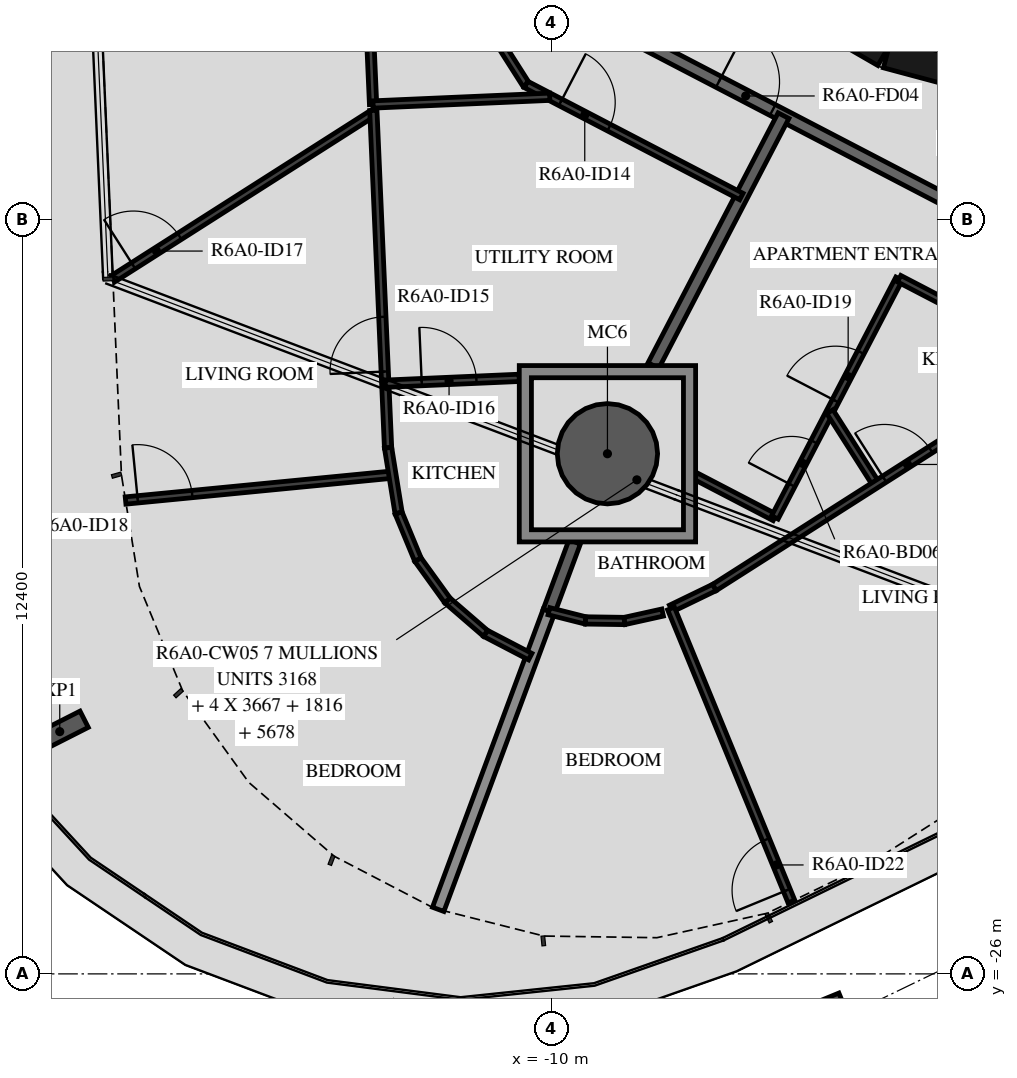
"""IFC4 building model, lengths in metres.
Left out: names, types, materials, properties, quantities, classifications, styles, units other than length and angle.
Written with IfcOpenShell. Run it as: python <this file> out.ifc"""

import sys

from ifc_helpers import new_model, si_unit, direction, frame, frame_2d, origin, origin_2d, place, context, subcontext, project, spatial, polyline, rectangle, hollow_circle, i_section, outline, extrude, element, fill, save


model = new_model("IFC4")
c1 = context("Model", 3, precision=1e-05, world=origin(), true_north=direction((0.0, 1.0)))
c2 = subcontext(c1, "Body", "Model", "MODEL_VIEW")
j1 = project(units=[si_unit("LENGTHUNIT", "METRE"), si_unit("PLANEANGLEUNIT", "RADIAN")], contexts=[c1])
p1 = place(None, origin())
s1 = spatial("IfcSite", under=j1, at=p1, CompositionType="ELEMENT")
p2 = place(p1, origin())
s2 = spatial("IfcBuilding", under=s1, at=p2, CompositionType="ELEMENT")
p3 = place(p2, frame((0.0, 0.0, 226.7)))
s3 = spatial("IfcBuildingStorey", under=s2, at=p3, CompositionType="ELEMENT", Elevation=226.7)
p4 = place(p3, frame((-9.082, -17.446, -0.45), z_axis=(0.0, 0.0, 1.0), x_axis=(1.0, 0.0, 0.0)))
e1 = element("IfcColumn", 1, at=p4, inside=s3, PredefinedType="COLUMN", context=c2, shape_type="SweptSolid", body=[
    extrude(hollow_circle(Radius=0.825, WallThickness=0.04, at=origin_2d()), origin(), (0.0, 0.0, 1.0), 3.57),
])
for number, where, z_axis, x_axis in (
    (2, (-18.089, -22.016, -0.45), (0.0, 0.0, 1.0), (-0.452, 0.892, 0.0)),
    (3, (-5.243, -26.789, -0.45), (0.0, 0.0, 1.0), (-0.925, -0.38, 0.0)),
):
    element("IfcColumn", number, at=place(p3, frame(where, z_axis=z_axis, x_axis=x_axis)), inside=s3, PredefinedType="COLUMN", context=c2, shape_type="SweptSolid", body=[
        extrude(i_section(OverallWidth=0.3, OverallDepth=0.9, WebThickness=0.019, FlangeThickness=0.035, FilletRadius=0.03, at=origin_2d()), origin(), (0.0, 0.0, 1.0), 3.57),
    ])
for number, where, z_axis, x_axis in (
    (4, (-7.137, -9.329, 0.0), (0.0, 0.0, 1.0), (0.866, -0.5, 0.0)),
    (5, (-4.479, -10.858, 0.0), (0.0, 0.0, 1.0), (0.966, -0.259, 0.0)),
):
    element("IfcWall", number, at=place(p3, frame(where, z_axis=z_axis, x_axis=x_axis)), inside=s3, PredefinedType="SHEAR", context=c2, shape_type="SweptSolid", body=[
        extrude(rectangle(XDim=3.033, YDim=0.5, at=frame_2d((1.516, 0.0))), origin(), (0.0, 0.0, 1.0), 3.12),
    ])
p5 = place(p3, frame((-9.372, -10.228, 0.0), z_axis=(0.0, 0.0, 1.0), x_axis=(0.887005184532, -0.461759464021, 0.0)))
e6 = element("IfcWall", 6, at=p5, inside=s3, PredefinedType="STANDARD", context=c2, shape_type="SweptSolid", body=[
    extrude(rectangle(XDim=7.181, YDim=0.2, at=frame_2d((3.591, 0.0))), origin(), (0.0, 0.0, 1.0), 3.12),
])
p6 = place(p5, frame((2.391, 0.0, 0.0)))
e7 = element("IfcOpeningElement", 7, at=p6, cuts=e6, PredefinedType="OPENING", context=c2, shape_type="SweptSolid", body=[
    extrude(rectangle(XDim=1.0, YDim=2.1, at=frame_2d((0.5, 1.05))), frame((0.0, 0.11, 0.0), z_axis=(0.0, -1.0, 0.0), x_axis=(1.0, 0.0, 0.0)), (0.0, 0.0, 1.0), 0.22),
])
p7 = place(p3, frame((-8.326, -15.996, 0.0), z_axis=(0.0, 0.0, 1.0), x_axis=(0.461739255077, 0.887015704664, 0.0)))
e8 = element("IfcWall", 8, at=p7, inside=s3, PredefinedType="STANDARD", context=c2, shape_type="SweptSolid", body=[
    extrude(rectangle(XDim=4.633, YDim=0.2, at=frame_2d((2.317, 0.0))), origin(), (0.0, 0.0, 1.0), 3.12),
])
p8 = place(p3, frame((-11.865, -24.939, 0.0), z_axis=(0.0, 0.0, 1.0), x_axis=(0.348236919929, 0.937406554062, 0.0)))
e9 = element("IfcWall", 9, at=p8, inside=s3, PredefinedType="STANDARD", context=c2, shape_type="SweptSolid", body=[
    extrude(rectangle(XDim=5.231, YDim=0.2, at=frame_2d((2.615, 0.0))), origin(), (0.0, 0.0, 1.0), 2.73),
])
p9 = place(p3, frame((-10.044, -20.036, 0.0), z_axis=(0.0, 0.0, 1.0), x_axis=(0.348282344491, 0.937389678051, 0.0)))
e10 = element("IfcWall", 10, at=p9, inside=s3, PredefinedType="STANDARD", context=c2, shape_type="SweptSolid", body=[
    extrude(rectangle(XDim=1.216, YDim=0.2, at=frame_2d((0.608, 0.0))), origin(), (0.0, 0.0, 1.0), 3.12),
])
p10 = place(p3, frame((-13.137, -7.111, 0.0), z_axis=(0.0, 0.0, 1.0), x_axis=(0.537300549444, -0.843390846267, 0.0)))
e11 = element("IfcWall", 11, at=p10, inside=s3, PredefinedType="PARTITIONING", context=c2, shape_type="SweptSolid", body=[
    extrude(rectangle(XDim=5.054, YDim=0.12, at=frame_2d((2.527, 0.0))), origin(), (0.0, 0.0, 1.0), 3.12),
])
p11 = place(p10, frame((1.5, 0.0, 0.0)))
e12 = element("IfcOpeningElement", 12, at=p11, cuts=e11, PredefinedType="OPENING", context=c2, shape_type="SweptSolid", body=[
    extrude(rectangle(XDim=0.8, YDim=2.1, at=frame_2d((0.4, 1.05))), frame((0.0, 0.07, 0.0), z_axis=(0.0, -1.0, 0.0), x_axis=(1.0, 0.0, 0.0)), (0.0, 0.0, 1.0), 0.14),
])
p12 = place(p3, frame((-10.421, -11.373, 0.0), z_axis=(0.0, 0.0, 1.0), x_axis=(0.887006451745, -0.461757029792, 0.0)))
e13 = element("IfcWall", 13, at=p12, inside=s3, PredefinedType="PARTITIONING", context=c2, shape_type="SweptSolid", body=[
    extrude(rectangle(XDim=3.992, YDim=0.12, at=frame_2d((1.996, 0.0))), origin(), (0.0, 0.0, 1.0), 3.12),
])
p13 = place(p12, frame((0.639, 0.0, 0.0)))
e14 = element("IfcOpeningElement", 14, at=p13, cuts=e13, PredefinedType="OPENING", context=c2, shape_type="SweptSolid", body=[
    extrude(rectangle(XDim=0.9, YDim=2.1, at=frame_2d((0.45, 1.05))), frame((0.0, 0.07, 0.0), z_axis=(0.0, -1.0, 0.0), x_axis=(1.0, 0.0, 0.0)), (0.0, 0.0, 1.0), 0.14),
])
p14 = place(p3, frame((-12.936, -11.703, 0.0), z_axis=(0.0, 0.0, 1.0), x_axis=(-0.043610108597, 0.999048626658, 0.0)))
e15 = element("IfcWall", 15, at=p14, inside=s3, PredefinedType="PARTITIONING", context=c2, shape_type="SweptSolid", body=[
    extrude(rectangle(XDim=4.596, YDim=0.12, at=frame_2d((2.298, 0.0))), origin(), (0.0, 0.0, 1.0), 3.12),
])
p15 = place(p3, frame((-17.215, -14.57, 0.0), z_axis=(0.0, 0.0, 1.0), x_axis=(0.843396239681, 0.537292083407, 0.0)))
e16 = element("IfcWall", 16, at=p15, inside=s3, PredefinedType="PARTITIONING", context=c2, shape_type="SweptSolid", body=[
    extrude(rectangle(XDim=5.081, YDim=0.12, at=frame_2d((2.54, 0.0))), origin(), (0.0, 0.0, 1.0), 3.12),
])
p16 = place(p15, frame((0.4, 0.0, 0.0)))
e17 = element("IfcOpeningElement", 17, at=p16, cuts=e16, PredefinedType="OPENING", context=c2, shape_type="SweptSolid", body=[
    extrude(rectangle(XDim=0.9, YDim=2.1, at=frame_2d((0.45, 1.05))), frame((0.0, 0.07, 0.0), z_axis=(0.0, -1.0, 0.0), x_axis=(1.0, 0.0, 0.0)), (0.0, 0.0, 1.0), 0.14),
])
p17 = place(p3, frame((-12.936, -11.703, 0.0), z_axis=(0.0, 0.0, 1.0), x_axis=(0.999046310188, 0.043663143495, 0.0)))
e18 = element("IfcWall", 18, at=p17, inside=s3, PredefinedType="PARTITIONING", context=c2, shape_type="SweptSolid", body=[
    extrude(rectangle(XDim=2.907, YDim=0.12, at=frame_2d((1.454, 0.0))), origin(), (0.0, 0.0, 1.0), 3.12),
])
p18 = place(p3, frame((-12.69, -17.347, 0.0), z_axis=(0.0, 0.0, 1.0), x_axis=(-0.043618497177, 0.999048260448, 0.0)))
e19 = element("IfcWall", 19, at=p18, inside=s3, PredefinedType="PARTITIONING", context=c2, shape_type="SweptSolid", body=[
    extrude(rectangle(XDim=5.552, YDim=0.12, at=frame_2d((2.776, 0.0))), origin(), (0.0, 0.0, 1.0), 3.12),
])
p19 = place(p18, frame((1.254, 0.0, 0.0)))
e20 = element("IfcOpeningElement", 20, at=p19, cuts=e19, PredefinedType="OPENING", context=c2, shape_type="SweptSolid", body=[
    extrude(rectangle(XDim=0.9, YDim=2.1, at=frame_2d((0.45, 1.05))), frame((0.0, 0.07, 0.0), z_axis=(0.0, -1.0, 0.0), x_axis=(1.0, 0.0, 0.0)), (0.0, 0.0, 1.0), 0.14),
])
p20 = place(p3, frame((-17.007, -18.216, 0.0), z_axis=(0.0, 0.0, 1.0), x_axis=(0.995320337688, 0.09663035436, 0.0)))
e21 = element("IfcWall", 21, at=p20, inside=s3, PredefinedType="PARTITIONING", context=c2, shape_type="SweptSolid", body=[
    extrude(rectangle(XDim=4.409, YDim=0.12, at=frame_2d((2.205, 0.0))), origin(), (0.0, 0.0, 1.0), 3.12),
])
p21 = place(p20, frame((0.2, 0.0, 0.0)))
e22 = element("IfcOpeningElement", 22, at=p21, cuts=e21, PredefinedType="OPENING", context=c2, shape_type="SweptSolid", body=[
    extrude(rectangle(XDim=0.9, YDim=2.1, at=frame_2d((0.45, 1.05))), frame((0.0, 0.07, 0.0), z_axis=(0.0, -1.0, 0.0), x_axis=(1.0, 0.0, 0.0)), (0.0, 0.0, 1.0), 0.14),
])
p22 = place(p3, frame((-12.517, -18.42, 0.0), z_axis=(0.0, 0.0, 1.0), x_axis=(-0.159260688022, 0.987236563976, 0.0)))
e23 = element("IfcWall", 23, at=p22, inside=s3, PredefinedType="PARTITIONING", context=c2, shape_type="SweptSolid", body=[
    extrude(rectangle(XDim=1.087, YDim=0.12, at=frame_2d((0.543, 0.0))), origin(), (0.0, 0.0, 1.0), 3.12),
])
p23 = place(p3, frame((-12.736, -16.295, 0.0), z_axis=(0.0, 0.0, 1.0), x_axis=(0.999043796611, 0.043720618177, 0.0)))
e24 = element("IfcWall", 24, at=p23, inside=s3, PredefinedType="PARTITIONING", context=c2, shape_type="SweptSolid", body=[
    extrude(rectangle(XDim=2.206, YDim=0.12, at=frame_2d((1.103, 0.0))), origin(), (0.0, 0.0, 1.0), 3.12),
])
p24 = place(p23, frame((0.6, 0.0, 0.0)))
e25 = element("IfcOpeningElement", 25, at=p24, cuts=e24, PredefinedType="OPENING", context=c2, shape_type="SweptSolid", body=[
    extrude(rectangle(XDim=0.9, YDim=2.1, at=frame_2d((0.45, 1.05))), frame((0.0, 0.07, 0.0), z_axis=(0.0, -1.0, 0.0), x_axis=(1.0, 0.0, 0.0)), (0.0, 0.0, 1.0), 0.14),
])
for number, where, z_axis, x_axis in (
    (26, (-10.352, -20.783, 0.0), (0.0, 0.0, 1.0), (-0.887, 0.462, 0.0)),
    (27, (-11.087, -20.4, 0.0), (0.0, 0.0, 1.0), (-0.757, 0.654, 0.0)),
):
    element("IfcWall", number, at=place(p3, frame(where, z_axis=z_axis, x_axis=x_axis)), inside=s3, PredefinedType="PARTITIONING", context=c2, shape_type="SweptSolid", body=[
        extrude(rectangle(XDim=0.829, YDim=0.12, at=frame_2d((0.415, 0.0))), origin(), (0.0, 0.0, 1.0), 3.12),
    ])
p25 = place(p3, frame((-11.714, -19.858, 0.0), z_axis=(0.0, 0.0, 1.0), x_axis=(-0.585436792562, 0.810718053281, 0.0)))
e28 = element("IfcWall", 28, at=p25, inside=s3, PredefinedType="PARTITIONING", context=c2, shape_type="SweptSolid", body=[
    extrude(rectangle(XDim=0.829, YDim=0.12, at=frame_2d((0.415, 0.0))), origin(), (0.0, 0.0, 1.0), 3.12),
])
p26 = place(p3, frame((-12.199, -19.186, 0.0), z_axis=(0.0, 0.0, 1.0), x_axis=(-0.382585904135, 0.923919923996, 0.0)))
e29 = element("IfcWall", 29, at=p26, inside=s3, PredefinedType="PARTITIONING", context=c2, shape_type="SweptSolid", body=[
    extrude(rectangle(XDim=0.829, YDim=0.12, at=frame_2d((0.415, 0.0))), origin(), (0.0, 0.0, 1.0), 3.12),
])
p27 = place(p3, frame((-7.632, -17.815, 0.0), z_axis=(0.0, 0.0, 1.0), x_axis=(0.886960889958, -0.461844540602, 0.0)))
e30 = element("IfcWall", 30, at=p27, inside=s3, PredefinedType="PARTITIONING", context=c2, shape_type="SweptSolid", body=[
    extrude(rectangle(XDim=1.469, YDim=0.12, at=frame_2d((0.734, 0.0))), origin(), (0.0, 0.0, 1.0), 3.12),
])
p28 = place(p3, frame((-6.329, -18.494, 0.0), z_axis=(0.0, 0.0, 1.0), x_axis=(0.461759058182, 0.887005395805, 0.0)))
e31 = element("IfcWall", 31, at=p28, inside=s3, PredefinedType="PARTITIONING", context=c2, shape_type="SweptSolid", body=[
    extrude(rectangle(XDim=4.427, YDim=0.12, at=frame_2d((2.213, 0.0))), origin(), (0.0, 0.0, 1.0), 3.12),
])
p29 = place(p28, frame((0.6, 0.0, 0.0)))
e32 = element("IfcOpeningElement", 32, at=p29, cuts=e31, PredefinedType="OPENING", context=c2, shape_type="SweptSolid", body=[
    extrude(rectangle(XDim=0.8, YDim=2.1, at=frame_2d((0.4, 1.05))), frame((0.0, 0.07, 0.0), z_axis=(0.0, -1.0, 0.0), x_axis=(1.0, 0.0, 0.0)), (0.0, 0.0, 1.0), 0.14),
])
p30 = place(p28, frame((2.161, 0.0, 0.0)))
e33 = element("IfcOpeningElement", 33, at=p30, cuts=e31, PredefinedType="OPENING", context=c2, shape_type="SweptSolid", body=[
    extrude(rectangle(XDim=0.9, YDim=2.1, at=frame_2d((0.45, 1.05))), frame((0.0, 0.07, 0.0), z_axis=(0.0, -1.0, 0.0), x_axis=(1.0, 0.0, 0.0)), (0.0, 0.0, 1.0), 0.14),
])
p31 = place(p3, frame((-4.285, -14.567, 0.0), z_axis=(0.0, 0.0, 1.0), x_axis=(0.887033177378, -0.46170568789, 0.0)))
e34 = element("IfcWall", 34, at=p31, inside=s3, PredefinedType="PARTITIONING", context=c2, shape_type="SweptSolid", body=[
    extrude(rectangle(XDim=1.067, YDim=0.12, at=frame_2d((0.534, 0.0))), origin(), (0.0, 0.0, 1.0), 3.12),
])
p32 = place(p3, frame((-10.044, -20.036, 0.0), z_axis=(0.0, 0.0, 1.0), x_axis=(0.969630684539, -0.24457378355, 0.0)))
e35 = element("IfcWall", 35, at=p32, inside=s3, PredefinedType="PARTITIONING", context=c2, shape_type="SweptSolid", body=[
    extrude(rectangle(XDim=0.62, YDim=0.12, at=frame_2d((0.31, 0.0))), origin(), (0.0, 0.0, 1.0), 3.12),
])
for number, where, z_axis, x_axis in (
    (36, (-9.443, -20.187, 0.0), (0.0, 0.0, 1.0), (1.0, -0.014, 0.0)),
    (37, (-8.801, -20.197, 0.0), (0.0, 0.0, 1.0), (0.976, 0.216, 0.0)),
):
    element("IfcWall", number, at=place(p3, frame(where, z_axis=z_axis, x_axis=x_axis)), inside=s3, PredefinedType="PARTITIONING", context=c2, shape_type="SweptSolid", body=[
        extrude(rectangle(XDim=0.642, YDim=0.12, at=frame_2d((0.321, 0.0))), origin(), (0.0, 0.0, 1.0), 3.12),
    ])
p33 = place(p3, frame((-4.662, -17.95, 0.0), z_axis=(0.0, 0.0, 1.0), x_axis=(-0.537254271207, 0.843420327043, 0.0)))
e38 = element("IfcWall", 38, at=p33, inside=s3, PredefinedType="PARTITIONING", context=c2, shape_type="SweptSolid", body=[
    extrude(rectangle(XDim=1.418, YDim=0.12, at=frame_2d((0.709, 0.0))), origin(), (0.0, 0.0, 1.0), 3.12),
])
p34 = place(p3, frame((-8.037, -19.991, 0.0), z_axis=(0.0, 0.0, 1.0), x_axis=(0.900073671326, 0.435737749323, 0.0)))
e39 = element("IfcWall", 39, at=p34, inside=s3, PredefinedType="PARTITIONING", context=c2, shape_type="SweptSolid", body=[
    extrude(rectangle(XDim=0.794, YDim=0.12, at=frame_2d((0.397, 0.0))), origin(), (0.0, 0.0, 1.0), 3.12),
])
p35 = place(p3, frame((-7.322, -19.645, 0.0), z_axis=(0.0, 0.0, 1.0), x_axis=(0.843385361817, 0.537309158188, 0.0)))
e40 = element("IfcWall", 40, at=p35, inside=s3, PredefinedType="PARTITIONING", context=c2, shape_type="SweptSolid", body=[
    extrude(rectangle(XDim=8.814, YDim=0.12, at=frame_2d((4.407, 0.0))), origin(), (0.0, 0.0, 1.0), 3.12),
])
p36 = place(p35, frame((3.314, 0.0, 0.0)))
e41 = element("IfcOpeningElement", 41, at=p36, cuts=e40, PredefinedType="OPENING", context=c2, shape_type="SweptSolid", body=[
    extrude(rectangle(XDim=0.9, YDim=2.1, at=frame_2d((0.45, 1.05))), frame((0.0, 0.07, 0.0), z_axis=(0.0, -1.0, 0.0), x_axis=(1.0, 0.0, 0.0)), (0.0, 0.0, 1.0), 0.14),
])
p37 = place(p3, frame((-6.057, -24.81, 0.0), z_axis=(0.0, 0.0, 1.0), x_axis=(-0.380052033163, 0.924965108579, 0.0)))
e42 = element("IfcWall", 42, at=p37, inside=s3, PredefinedType="PARTITIONING", context=c2, shape_type="SweptSolid", body=[
    extrude(rectangle(XDim=5.21, YDim=0.12, at=frame_2d((2.605, 0.0))), origin(), (0.0, 0.0, 1.0), 3.12),
])
p38 = place(p37, frame((0.2, 0.0, 0.0)))
e43 = element("IfcOpeningElement", 43, at=p38, cuts=e42, PredefinedType="OPENING", context=c2, shape_type="SweptSolid", body=[
    extrude(rectangle(XDim=0.9, YDim=2.1, at=frame_2d((0.45, 1.05))), frame((0.0, 0.07, 0.0), z_axis=(0.0, -1.0, 0.0), x_axis=(1.0, 0.0, 0.0)), (0.0, 0.0, 1.0), 0.14),
])
p39 = place(p3, origin())
e44 = element("IfcWall", 44, at=p39, inside=s3, PredefinedType="STANDARD", context=c2, shape_type="SweptSolid", body=[
    extrude(outline(polyline([(-7.632, -15.996), (-7.632, -18.896), (-10.532, -18.896), (-10.532, -15.996), (-7.632, -15.996)]), holes=[polyline([(-10.332, -18.696), (-7.832, -18.696), (-7.832, -16.196), (-10.332, -16.196), (-10.332, -18.696)])]), origin(), (0.0, 0.0, 1.0), 3.12),
])
p40 = place(p6, origin())
e45 = element("IfcDoor", 45, at=p40, inside=s3, OperationType="SINGLE_SWING_RIGHT", PredefinedType="DOOR", context=c2, shape_type="SweptSolid", body=[
    extrude(rectangle(XDim=1.0, YDim=2.1, at=frame_2d((0.5, 1.05))), frame((0.0, 0.025, 0.0), z_axis=(0.0, -1.0, 0.0), x_axis=(1.0, 0.0, 0.0)), (0.0, 0.0, 1.0), 0.05),
])
fill(e7, e45)
p41 = place(p13, origin())
e46 = element("IfcDoor", 46, at=p41, inside=s3, OperationType="SINGLE_SWING_RIGHT", PredefinedType="DOOR", context=c2, shape_type="SweptSolid", body=[
    extrude(rectangle(XDim=0.9, YDim=2.1, at=frame_2d((0.45, 1.05))), frame((0.0, 0.025, 0.0), z_axis=(0.0, -1.0, 0.0), x_axis=(1.0, 0.0, 0.0)), (0.0, 0.0, 1.0), 0.05),
])
fill(e14, e46)
p42 = place(p19, origin())
e47 = element("IfcDoor", 47, at=p42, inside=s3, OperationType="SINGLE_SWING_RIGHT", PredefinedType="DOOR", context=c2, shape_type="SweptSolid", body=[
    extrude(rectangle(XDim=0.9, YDim=2.1, at=frame_2d((0.45, 1.05))), frame((0.0, 0.025, 0.0), z_axis=(0.0, -1.0, 0.0), x_axis=(1.0, 0.0, 0.0)), (0.0, 0.0, 1.0), 0.05),
])
fill(e20, e47)
p43 = place(p24, origin())
e48 = element("IfcDoor", 48, at=p43, inside=s3, OperationType="SINGLE_SWING_RIGHT", PredefinedType="DOOR", context=c2, shape_type="SweptSolid", body=[
    extrude(rectangle(XDim=0.9, YDim=2.1, at=frame_2d((0.45, 1.05))), frame((0.0, 0.025, 0.0), z_axis=(0.0, -1.0, 0.0), x_axis=(1.0, 0.0, 0.0)), (0.0, 0.0, 1.0), 0.05),
])
fill(e25, e48)
p44 = place(p16, origin())
e49 = element("IfcDoor", 49, at=p44, inside=s3, OperationType="SINGLE_SWING_LEFT", PredefinedType="DOOR", context=c2, shape_type="SweptSolid", body=[
    extrude(rectangle(XDim=0.9, YDim=2.1, at=frame_2d((0.45, 1.05))), frame((0.0, 0.025, 0.0), z_axis=(0.0, -1.0, 0.0), x_axis=(1.0, 0.0, 0.0)), (0.0, 0.0, 1.0), 0.05),
])
fill(e17, e49)
p45 = place(p21, origin())
e50 = element("IfcDoor", 50, at=p45, inside=s3, OperationType="SINGLE_SWING_RIGHT", PredefinedType="DOOR", context=c2, shape_type="SweptSolid", body=[
    extrude(rectangle(XDim=0.9, YDim=2.1, at=frame_2d((0.45, 1.05))), frame((0.0, 0.025, 0.0), z_axis=(0.0, -1.0, 0.0), x_axis=(1.0, 0.0, 0.0)), (0.0, 0.0, 1.0), 0.05),
])
fill(e22, e50)
p46 = place(p29, origin())
e51 = element("IfcDoor", 51, at=p46, inside=s3, OperationType="SINGLE_SWING_LEFT", PredefinedType="DOOR", context=c2, shape_type="SweptSolid", body=[
    extrude(rectangle(XDim=0.8, YDim=2.1, at=frame_2d((0.4, 1.05))), frame((0.0, 0.025, 0.0), z_axis=(0.0, -1.0, 0.0), x_axis=(1.0, 0.0, 0.0)), (0.0, 0.0, 1.0), 0.05),
])
fill(e32, e51)
p47 = place(p30, origin())
e52 = element("IfcDoor", 52, at=p47, inside=s3, OperationType="SINGLE_SWING_LEFT", PredefinedType="DOOR", context=c2, shape_type="SweptSolid", body=[
    extrude(rectangle(XDim=0.9, YDim=2.1, at=frame_2d((0.45, 1.05))), frame((0.0, 0.025, 0.0), z_axis=(0.0, -1.0, 0.0), x_axis=(1.0, 0.0, 0.0)), (0.0, 0.0, 1.0), 0.05),
])
fill(e33, e52)
p48 = place(p36, origin())
e53 = element("IfcDoor", 53, at=p48, inside=s3, OperationType="SINGLE_SWING_LEFT", PredefinedType="DOOR", context=c2, shape_type="SweptSolid", body=[
    extrude(rectangle(XDim=0.9, YDim=2.1, at=frame_2d((0.45, 1.05))), frame((0.0, 0.025, 0.0), z_axis=(0.0, -1.0, 0.0), x_axis=(1.0, 0.0, 0.0)), (0.0, 0.0, 1.0), 0.05),
])
fill(e41, e53)
p49 = place(p38, origin())
e54 = element("IfcDoor", 54, at=p49, inside=s3, OperationType="SINGLE_SWING_LEFT", PredefinedType="DOOR", context=c2, shape_type="SweptSolid", body=[
    extrude(rectangle(XDim=0.9, YDim=2.1, at=frame_2d((0.45, 1.05))), frame((0.0, 0.025, 0.0), z_axis=(0.0, -1.0, 0.0), x_axis=(1.0, 0.0, 0.0)), (0.0, 0.0, 1.0), 0.05),
])
fill(e43, e54)
save(model, sys.argv[1])
